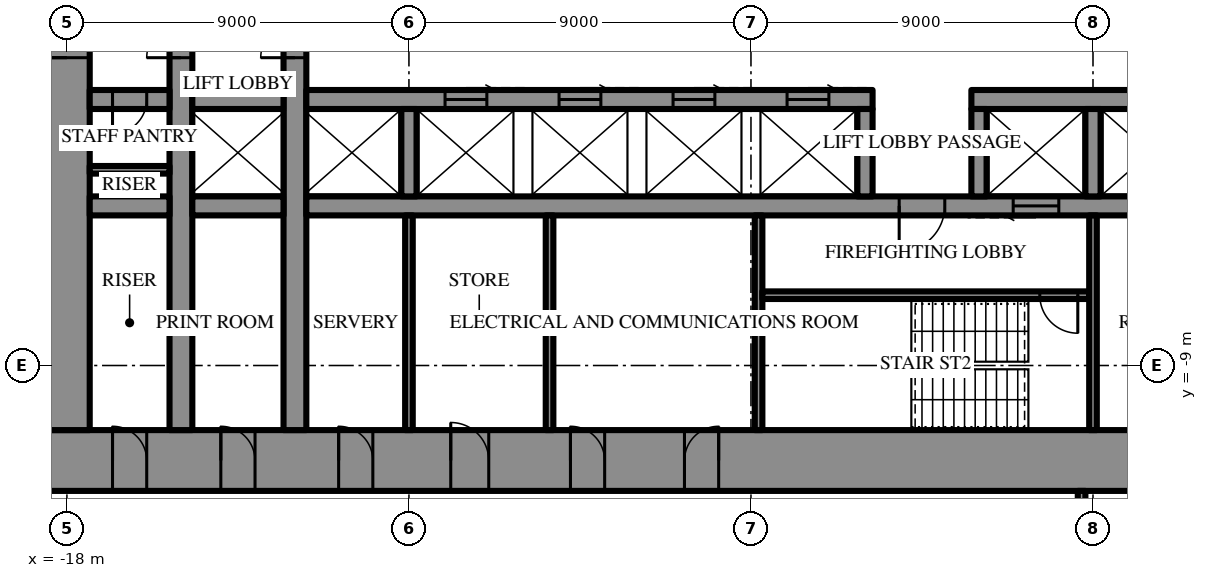
"""IFC4 building model, lengths in metres.
Left out: names, types, materials, properties, quantities, classifications, styles, units other than length and angle.
Written with IfcOpenShell. Run it as: python <this file> out.ifc"""

import sys

from ifc_helpers import new_model, si_unit, direction, frame, frame_2d, origin, place, context, subcontext, project, spatial, rectangle, extrude, element, fill, save


model = new_model("IFC4")
c1 = context("Model", 3, precision=1e-05, world=origin(), true_north=direction((0.0, 1.0)))
c2 = subcontext(c1, "Body", "Model", "MODEL_VIEW")
j1 = project(units=[si_unit("LENGTHUNIT", "METRE"), si_unit("PLANEANGLEUNIT", "RADIAN")], contexts=[c1])
p1 = place(None, origin())
s1 = spatial("IfcSite", under=j1, at=p1, CompositionType="ELEMENT")
p2 = place(p1, origin())
s2 = spatial("IfcBuilding", under=s1, at=p2, CompositionType="ELEMENT")
p3 = place(p2, frame((0.0, 0.0, 144.7)))
s3 = spatial("IfcBuildingStorey", under=s2, at=p3, CompositionType="ELEMENT", Elevation=144.7)
p4 = place(p3, frame((18.6, -11.5, 0.0), z_axis=(0.0, 0.0, 1.0), x_axis=(-1.0, 0.0, 0.0)))
e1 = element("IfcWall", 1, at=p4, inside=s3, PredefinedType="SHEAR", context=c2, shape_type="SweptSolid", body=[
    extrude(rectangle(XDim=37.2, YDim=1.6, at=frame_2d((18.6, 0.0))), origin(), (0.0, 0.0, 1.0), 4.2),
])
p5 = place(p4, frame((19.45, 0.0, 0.0)))
e2 = element("IfcOpeningElement", 2, at=p5, cuts=e1, PredefinedType="OPENING", context=c2, shape_type="SweptSolid", body=[
    extrude(rectangle(XDim=0.9, YDim=2.2, at=frame_2d((0.45, 1.1))), frame((0.0, 0.81, 0.0), z_axis=(0.0, -1.0, 0.0), x_axis=(1.0, 0.0, 0.0)), (0.0, 0.0, 1.0), 1.62),
])
p6 = place(p4, frame((22.45, 0.0, 0.0)))
e3 = element("IfcOpeningElement", 3, at=p6, cuts=e1, PredefinedType="OPENING", context=c2, shape_type="SweptSolid", body=[
    extrude(rectangle(XDim=0.9, YDim=2.2, at=frame_2d((0.45, 1.1))), frame((0.0, 0.81, 0.0), z_axis=(0.0, -1.0, 0.0), x_axis=(1.0, 0.0, 0.0)), (0.0, 0.0, 1.0), 1.62),
])
p7 = place(p4, frame((25.5, 0.0, 0.0)))
e4 = element("IfcOpeningElement", 4, at=p7, cuts=e1, PredefinedType="OPENING", context=c2, shape_type="SweptSolid", body=[
    extrude(rectangle(XDim=1.0, YDim=2.2, at=frame_2d((0.5, 1.1))), frame((0.0, 0.81, 0.0), z_axis=(0.0, -1.0, 0.0), x_axis=(1.0, 0.0, 0.0)), (0.0, 0.0, 1.0), 1.62),
])
p8 = place(p4, frame((1.8, 0.0, 0.0)))
e5 = element("IfcOpeningElement", 5, at=p8, cuts=e1, PredefinedType="OPENING", context=c2, shape_type="SweptSolid", body=[
    extrude(rectangle(XDim=0.9, YDim=2.2, at=frame_2d((0.45, 1.1))), frame((0.0, 0.81, 0.0), z_axis=(0.0, -1.0, 0.0), x_axis=(1.0, 0.0, 0.0)), (0.0, 0.0, 1.0), 1.62),
])
p9 = place(p4, frame((4.65, 0.0, 0.0)))
e6 = element("IfcOpeningElement", 6, at=p9, cuts=e1, PredefinedType="OPENING", context=c2, shape_type="SweptSolid", body=[
    extrude(rectangle(XDim=0.9, YDim=2.2, at=frame_2d((0.45, 1.1))), frame((0.0, 0.81, 0.0), z_axis=(0.0, -1.0, 0.0), x_axis=(1.0, 0.0, 0.0)), (0.0, 0.0, 1.0), 1.62),
])
p10 = place(p4, frame((7.75, 0.0, 0.0)))
e7 = element("IfcOpeningElement", 7, at=p10, cuts=e1, PredefinedType="OPENING", context=c2, shape_type="SweptSolid", body=[
    extrude(rectangle(XDim=0.9, YDim=2.2, at=frame_2d((0.45, 1.1))), frame((0.0, 0.81, 0.0), z_axis=(0.0, -1.0, 0.0), x_axis=(1.0, 0.0, 0.0)), (0.0, 0.0, 1.0), 1.62),
])
p11 = place(p4, frame((28.55, 0.0, 0.0)))
e8 = element("IfcOpeningElement", 8, at=p11, cuts=e1, PredefinedType="OPENING", context=c2, shape_type="SweptSolid", body=[
    extrude(rectangle(XDim=0.9, YDim=2.2, at=frame_2d((0.45, 1.1))), frame((0.0, 0.81, 0.0), z_axis=(0.0, -1.0, 0.0), x_axis=(1.0, 0.0, 0.0)), (0.0, 0.0, 1.0), 1.62),
])
p12 = place(p4, frame((31.65, 0.0, 0.0)))
e9 = element("IfcOpeningElement", 9, at=p12, cuts=e1, PredefinedType="OPENING", context=c2, shape_type="SweptSolid", body=[
    extrude(rectangle(XDim=0.9, YDim=2.2, at=frame_2d((0.45, 1.1))), frame((0.0, 0.81, 0.0), z_axis=(0.0, -1.0, 0.0), x_axis=(1.0, 0.0, 0.0)), (0.0, 0.0, 1.0), 1.62),
])
p13 = place(p4, frame((34.5, 0.0, 0.0)))
e10 = element("IfcOpeningElement", 10, at=p13, cuts=e1, PredefinedType="OPENING", context=c2, shape_type="SweptSolid", body=[
    extrude(rectangle(XDim=0.9, YDim=2.2, at=frame_2d((0.45, 1.1))), frame((0.0, 0.81, 0.0), z_axis=(0.0, -1.0, 0.0), x_axis=(1.0, 0.0, 0.0)), (0.0, 0.0, 1.0), 1.62),
])
p14 = place(p3, frame((-18.0, 10.7, 0.0), z_axis=(0.0, 0.0, 1.0), x_axis=(0.0, -1.0, 0.0)))
e11 = element("IfcWall", 11, at=p14, inside=s3, PredefinedType="SHEAR", context=c2, shape_type="SweptSolid", body=[
    extrude(rectangle(XDim=21.4, YDim=1.2, at=frame_2d((10.7, 0.0))), origin(), (0.0, 0.0, 1.0), 4.2),
])
p15 = place(p14, frame((9.8, 0.0, 0.0)))
e12 = element("IfcOpeningElement", 12, at=p15, cuts=e11, PredefinedType="OPENING", context=c2, shape_type="SweptSolid", body=[
    extrude(rectangle(XDim=1.8, YDim=2.4, at=frame_2d((0.9, 1.2))), frame((0.0, 0.61, 0.0), z_axis=(0.0, -1.0, 0.0), x_axis=(1.0, 0.0, 0.0)), (0.0, 0.0, 1.0), 1.22),
])
p16 = place(p3, frame((-12.0, -10.7, 0.0), z_axis=(0.0, 0.0, 1.0), x_axis=(0.0, 1.0, 0.0)))
e13 = element("IfcWall", 13, at=p16, inside=s3, PredefinedType="SHEAR", context=c2, shape_type="SweptSolid", body=[
    extrude(rectangle(XDim=21.4, YDim=0.6, at=frame_2d((10.7, 0.0))), origin(), (0.0, 0.0, 1.0), 4.2),
])
p17 = place(p16, frame((9.8, 0.0, 0.0)))
e14 = element("IfcOpeningElement", 14, at=p17, cuts=e13, PredefinedType="OPENING", context=c2, shape_type="SweptSolid", body=[
    extrude(rectangle(XDim=1.8, YDim=2.4, at=frame_2d((0.9, 1.2))), frame((0.0, 0.31, 0.0), z_axis=(0.0, -1.0, 0.0), x_axis=(1.0, 0.0, 0.0)), (0.0, 0.0, 1.0), 0.62),
])
p18 = place(p3, frame((-15.0, -10.7, 0.0), z_axis=(0.0, 0.0, 1.0), x_axis=(0.0, 1.0, 0.0)))
e15 = element("IfcWall", 15, at=p18, inside=s3, PredefinedType="SHEAR", context=c2, shape_type="SweptSolid", body=[
    extrude(rectangle(XDim=21.4, YDim=0.6, at=frame_2d((10.7, 0.0))), origin(), (0.0, 0.0, 1.0), 4.2),
])
p19 = place(p18, frame((9.8, 0.0, 0.0)))
e16 = element("IfcOpeningElement", 16, at=p19, cuts=e15, PredefinedType="OPENING", context=c2, shape_type="SweptSolid", body=[
    extrude(rectangle(XDim=1.8, YDim=2.4, at=frame_2d((0.9, 1.2))), frame((0.0, 0.31, 0.0), z_axis=(0.0, -1.0, 0.0), x_axis=(1.0, 0.0, 0.0)), (0.0, 0.0, 1.0), 0.62),
])
p20 = place(p3, frame((11.7, -2.0, 0.0), z_axis=(0.0, 0.0, 1.0), x_axis=(-1.0, 0.0, 0.0)))
e17 = element("IfcWall", 17, at=p20, inside=s3, PredefinedType="SHEAR", context=c2, shape_type="SweptSolid", body=[
    extrude(rectangle(XDim=5.9, YDim=0.5, at=frame_2d((2.95, 0.0))), origin(), (0.0, 0.0, 1.0), 4.2),
])
p21 = place(p3, frame((3.2, -2.0, 0.0), z_axis=(0.0, 0.0, 1.0), x_axis=(-1.0, 0.0, 0.0)))
e18 = element("IfcWall", 18, at=p21, inside=s3, PredefinedType="SHEAR", context=c2, shape_type="SweptSolid", body=[
    extrude(rectangle(XDim=14.9, YDim=0.5, at=frame_2d((7.45, 0.0))), origin(), (0.0, 0.0, 1.0), 4.2),
])
p22 = place(p21, frame((1.15, 0.0, 0.0)))
e19 = element("IfcOpeningElement", 19, at=p22, cuts=e18, PredefinedType="OPENING", context=c2, shape_type="SweptSolid", body=[
    extrude(rectangle(XDim=1.1, YDim=2.2, at=frame_2d((0.55, 1.1))), frame((0.0, 0.26, 0.0), z_axis=(0.0, -1.0, 0.0), x_axis=(1.0, 0.0, 0.0)), (0.0, 0.0, 1.0), 0.52),
])
p23 = place(p21, frame((4.15, 0.0, 0.0)))
e20 = element("IfcOpeningElement", 20, at=p23, cuts=e18, PredefinedType="OPENING", context=c2, shape_type="SweptSolid", body=[
    extrude(rectangle(XDim=1.1, YDim=2.2, at=frame_2d((0.55, 1.1))), frame((0.0, 0.26, 0.0), z_axis=(0.0, -1.0, 0.0), x_axis=(1.0, 0.0, 0.0)), (0.0, 0.0, 1.0), 0.52),
])
p24 = place(p21, frame((7.15, 0.0, 0.0)))
e21 = element("IfcOpeningElement", 21, at=p24, cuts=e18, PredefinedType="OPENING", context=c2, shape_type="SweptSolid", body=[
    extrude(rectangle(XDim=1.1, YDim=2.2, at=frame_2d((0.55, 1.1))), frame((0.0, 0.26, 0.0), z_axis=(0.0, -1.0, 0.0), x_axis=(1.0, 0.0, 0.0)), (0.0, 0.0, 1.0), 0.52),
])
p25 = place(p21, frame((10.15, 0.0, 0.0)))
e22 = element("IfcOpeningElement", 22, at=p25, cuts=e18, PredefinedType="OPENING", context=c2, shape_type="SweptSolid", body=[
    extrude(rectangle(XDim=1.1, YDim=2.2, at=frame_2d((0.55, 1.1))), frame((0.0, 0.26, 0.0), z_axis=(0.0, -1.0, 0.0), x_axis=(1.0, 0.0, 0.0)), (0.0, 0.0, 1.0), 0.52),
])
p26 = place(p3, frame((-12.3, -2.0, 0.0), z_axis=(0.0, 0.0, 1.0), x_axis=(-1.0, 0.0, 0.0)))
e23 = element("IfcWall", 23, at=p26, inside=s3, PredefinedType="SHEAR", context=c2, shape_type="SweptSolid", body=[
    extrude(rectangle(XDim=2.4, YDim=0.5, at=frame_2d((1.2, 0.0))), origin(), (0.0, 0.0, 1.0), 4.2),
])
p27 = place(p3, frame((-15.3, -2.0, 0.0), z_axis=(0.0, 0.0, 1.0), x_axis=(-1.0, 0.0, 0.0)))
e24 = element("IfcWall", 24, at=p27, inside=s3, PredefinedType="SHEAR", context=c2, shape_type="SweptSolid", body=[
    extrude(rectangle(XDim=2.1, YDim=0.5, at=frame_2d((1.05, 0.0))), origin(), (0.0, 0.0, 1.0), 4.2),
])
p28 = place(p27, frame((0.6, 0.0, 0.0)))
e25 = element("IfcOpeningElement", 25, at=p28, cuts=e24, PredefinedType="OPENING", context=c2, shape_type="SweptSolid", body=[
    extrude(rectangle(XDim=0.9, YDim=2.2, at=frame_2d((0.45, 1.1))), frame((0.0, 0.26, 0.0), z_axis=(0.0, -1.0, 0.0), x_axis=(1.0, 0.0, 0.0)), (0.0, 0.0, 1.0), 0.52),
])
p29 = place(p3, frame((11.7, -4.8, 0.0), z_axis=(0.0, 0.0, 1.0), x_axis=(-1.0, 0.0, 0.0)))
e26 = element("IfcWall", 26, at=p29, inside=s3, PredefinedType="SHEAR", context=c2, shape_type="SweptSolid", body=[
    extrude(rectangle(XDim=23.4, YDim=0.5, at=frame_2d((11.7, 0.0))), origin(), (0.0, 0.0, 1.0), 4.2),
])
p30 = place(p29, frame((6.6, 0.0, 0.0)))
e27 = element("IfcOpeningElement", 27, at=p30, cuts=e26, PredefinedType="OPENING", context=c2, shape_type="SweptSolid", body=[
    extrude(rectangle(XDim=1.2, YDim=2.2, at=frame_2d((0.6, 1.1))), frame((0.0, 0.26, 0.0), z_axis=(0.0, -1.0, 0.0), x_axis=(1.0, 0.0, 0.0)), (0.0, 0.0, 1.0), 0.52),
])
p31 = place(p29, frame((3.6, 0.0, 0.0)))
e28 = element("IfcOpeningElement", 28, at=p31, cuts=e26, PredefinedType="OPENING", context=c2, shape_type="SweptSolid", body=[
    extrude(rectangle(XDim=1.2, YDim=2.2, at=frame_2d((0.6, 1.1))), frame((0.0, 0.26, 0.0), z_axis=(0.0, -1.0, 0.0), x_axis=(1.0, 0.0, 0.0)), (0.0, 0.0, 1.0), 0.52),
])
p32 = place(p3, frame((-12.3, -4.8, 0.0), z_axis=(0.0, 0.0, 1.0), x_axis=(-1.0, 0.0, 0.0)))
e29 = element("IfcWall", 29, at=p32, inside=s3, PredefinedType="SHEAR", context=c2, shape_type="SweptSolid", body=[
    extrude(rectangle(XDim=2.4, YDim=0.5, at=frame_2d((1.2, 0.0))), origin(), (0.0, 0.0, 1.0), 4.2),
])
p33 = place(p3, frame((-15.3, -4.8, 0.0), z_axis=(0.0, 0.0, 1.0), x_axis=(-1.0, 0.0, 0.0)))
e30 = element("IfcWall", 30, at=p33, inside=s3, PredefinedType="SHEAR", context=c2, shape_type="SweptSolid", body=[
    extrude(rectangle(XDim=2.1, YDim=0.5, at=frame_2d((1.05, 0.0))), origin(), (0.0, 0.0, 1.0), 4.2),
])
for number, where, z_axis, x_axis in (
    (31, (9.0, -2.25, 0.0), (0.0, 0.0, 1.0), (0.0, -1.0, 0.0)),
    (32, (6.0, -2.25, 0.0), (0.0, 0.0, 1.0), (0.0, -1.0, 0.0)),
    (33, (3.0, -2.25, 0.0), (0.0, 0.0, 1.0), (0.0, -1.0, 0.0)),
    (34, (-9.0, -2.25, 0.0), (0.0, 0.0, 1.0), (0.0, -1.0, 0.0)),
):
    element("IfcWall", number, at=place(p3, frame(where, z_axis=z_axis, x_axis=x_axis)), inside=s3, PredefinedType="SHEAR", context=c2, shape_type="SweptSolid", body=[
        extrude(rectangle(XDim=2.3, YDim=0.4, at=frame_2d((1.15, 0.0))), origin(), (0.0, 0.0, 1.0), 4.2),
    ])
p34 = place(p3, frame((0.2, -5.05, 0.0), z_axis=(0.0, 0.0, 1.0), x_axis=(0.0, -1.0, 0.0)))
e35 = element("IfcWall", 35, at=p34, inside=s3, PredefinedType="SHEAR", context=c2, shape_type="SweptSolid", body=[
    extrude(rectangle(XDim=5.65, YDim=0.2, at=frame_2d((2.825, 0.0))), origin(), (0.0, 0.0, 1.0), 4.2),
])
p35 = place(p3, frame((8.9, -7.15, 0.0), z_axis=(0.0, 0.0, 1.0), x_axis=(-1.0, 0.0, 0.0)))
e36 = element("IfcWall", 36, at=p35, inside=s3, PredefinedType="SHEAR", context=c2, shape_type="SweptSolid", body=[
    extrude(rectangle(XDim=8.6, YDim=0.2, at=frame_2d((4.3, 0.0))), origin(), (0.0, 0.0, 1.0), 4.2),
])
p36 = place(p35, frame((0.3, 0.0, 0.0)))
e37 = element("IfcOpeningElement", 37, at=p36, cuts=e36, PredefinedType="OPENING", context=c2, shape_type="SweptSolid", body=[
    extrude(rectangle(XDim=1.0, YDim=2.2, at=frame_2d((0.5, 1.1))), frame((0.0, 0.11, 0.0), z_axis=(0.0, -1.0, 0.0), x_axis=(1.0, 0.0, 0.0)), (0.0, 0.0, 1.0), 0.22),
])
for number, where, z_axis, x_axis in (
    (38, (9.0, -5.05, 0.0), (0.0, 0.0, 1.0), (0.0, -1.0, 0.0)),
    (39, (-9.0, -5.05, 0.0), (0.0, 0.0, 1.0), (0.0, -1.0, 0.0)),
    (40, (-5.3, -5.05, 0.0), (0.0, 0.0, 1.0), (0.0, -1.0, 0.0)),
):
    element("IfcWall", number, at=place(p3, frame(where, z_axis=z_axis, x_axis=x_axis)), inside=s3, PredefinedType="PARTITIONING", context=c2, shape_type="SweptSolid", body=[
        extrude(rectangle(XDim=5.65, YDim=0.2, at=frame_2d((2.825, 0.0))), origin(), (0.0, 0.0, 1.0), 4.0),
    ])
p37 = place(p3, frame((-15.3, -3.85, 0.0), z_axis=(0.0, 0.0, 1.0), x_axis=(-1.0, 0.0, 0.0)))
e41 = element("IfcWall", 41, at=p37, inside=s3, PredefinedType="PARTITIONING", context=c2, shape_type="SweptSolid", body=[
    extrude(rectangle(XDim=2.1, YDim=0.2, at=frame_2d((1.05, 0.0))), origin(), (0.0, 0.0, 1.0), 4.0),
])
p38 = place(p3, frame((8.7, -12.3, 0.0), z_axis=(0.0, 0.0, 1.0), x_axis=(0.0, -1.0, 0.0)))
e42 = element("IfcWall", 42, at=p38, inside=s3, PredefinedType="PARTITIONING", context=c2, shape_type="SweptSolid", body=[
    extrude(rectangle(XDim=19.0, YDim=0.2, at=frame_2d((9.5, 0.0))), origin(), (0.0, 0.0, 1.0), 4.0),
])
p39 = place(p38, frame((1.4, 0.0, 0.0)))
e43 = element("IfcOpeningElement", 43, at=p39, cuts=e42, PredefinedType="OPENING", context=c2, shape_type="SweptSolid", body=[
    extrude(rectangle(XDim=1.0, YDim=2.2, at=frame_2d((0.5, 1.1))), frame((0.0, 0.11, 0.0), z_axis=(0.0, -1.0, 0.0), x_axis=(1.0, 0.0, 0.0)), (0.0, 0.0, 1.0), 0.22),
])
p40 = place(p15, frame((1.8, 0.0, 0.0), z_axis=(0.0, 0.0, 1.0), x_axis=(-1.0, 0.0, 0.0)))
e44 = element("IfcDoor", 44, at=p40, inside=s3, OperationType="DOUBLE_DOOR_SINGLE_SWING", PredefinedType="DOOR", context=c2, shape_type="SweptSolid", body=[
    extrude(rectangle(XDim=1.8, YDim=2.4, at=frame_2d((0.9, 1.2))), frame((0.0, 0.025, 0.0), z_axis=(0.0, -1.0, 0.0), x_axis=(1.0, 0.0, 0.0)), (0.0, 0.0, 1.0), 0.05),
])
fill(e12, e44)
p41 = place(p30, origin())
e45 = element("IfcDoor", 45, at=p41, inside=s3, OperationType="SINGLE_SWING_LEFT", PredefinedType="DOOR", context=c2, shape_type="SweptSolid", body=[
    extrude(rectangle(XDim=1.2, YDim=2.2, at=frame_2d((0.6, 1.1))), frame((0.0, 0.025, 0.0), z_axis=(0.0, -1.0, 0.0), x_axis=(1.0, 0.0, 0.0)), (0.0, 0.0, 1.0), 0.05),
])
fill(e27, e45)
p42 = place(p36, origin())
e46 = element("IfcDoor", 46, at=p42, inside=s3, OperationType="SINGLE_SWING_RIGHT", PredefinedType="DOOR", context=c2, shape_type="SweptSolid", body=[
    extrude(rectangle(XDim=1.0, YDim=2.2, at=frame_2d((0.5, 1.1))), frame((0.0, 0.025, 0.0), z_axis=(0.0, -1.0, 0.0), x_axis=(1.0, 0.0, 0.0)), (0.0, 0.0, 1.0), 0.05),
])
fill(e37, e46)
p43 = place(p5, frame((0.9, 0.0, 0.0), z_axis=(0.0, 0.0, 1.0), x_axis=(-1.0, 0.0, 0.0)))
e47 = element("IfcDoor", 47, at=p43, inside=s3, OperationType="SINGLE_SWING_LEFT", PredefinedType="DOOR", context=c2, shape_type="SweptSolid", body=[
    extrude(rectangle(XDim=0.9, YDim=2.2, at=frame_2d((0.45, 1.1))), frame((0.0, 0.025, 0.0), z_axis=(0.0, -1.0, 0.0), x_axis=(1.0, 0.0, 0.0)), (0.0, 0.0, 1.0), 0.05),
])
fill(e2, e47)
p44 = place(p6, frame((0.9, 0.0, 0.0), z_axis=(0.0, 0.0, 1.0), x_axis=(-1.0, 0.0, 0.0)))
e48 = element("IfcDoor", 48, at=p44, inside=s3, OperationType="SINGLE_SWING_RIGHT", PredefinedType="DOOR", context=c2, shape_type="SweptSolid", body=[
    extrude(rectangle(XDim=0.9, YDim=2.2, at=frame_2d((0.45, 1.1))), frame((0.0, 0.025, 0.0), z_axis=(0.0, -1.0, 0.0), x_axis=(1.0, 0.0, 0.0)), (0.0, 0.0, 1.0), 0.05),
])
fill(e3, e48)
p45 = place(p7, frame((1.0, 0.0, 0.0), z_axis=(0.0, 0.0, 1.0), x_axis=(-1.0, 0.0, 0.0)))
e49 = element("IfcDoor", 49, at=p45, inside=s3, OperationType="SINGLE_SWING_RIGHT", PredefinedType="DOOR", context=c2, shape_type="SweptSolid", body=[
    extrude(rectangle(XDim=1.0, YDim=2.2, at=frame_2d((0.5, 1.1))), frame((0.0, 0.025, 0.0), z_axis=(0.0, -1.0, 0.0), x_axis=(1.0, 0.0, 0.0)), (0.0, 0.0, 1.0), 0.05),
])
fill(e4, e49)
p46 = place(p11, frame((0.9, 0.0, 0.0), z_axis=(0.0, 0.0, 1.0), x_axis=(-1.0, 0.0, 0.0)))
e50 = element("IfcDoor", 50, at=p46, inside=s3, OperationType="SINGLE_SWING_RIGHT", PredefinedType="DOOR", context=c2, shape_type="SweptSolid", body=[
    extrude(rectangle(XDim=0.9, YDim=2.2, at=frame_2d((0.45, 1.1))), frame((0.0, 0.025, 0.0), z_axis=(0.0, -1.0, 0.0), x_axis=(1.0, 0.0, 0.0)), (0.0, 0.0, 1.0), 0.05),
])
fill(e8, e50)
p47 = place(p12, frame((0.9, 0.0, 0.0), z_axis=(0.0, 0.0, 1.0), x_axis=(-1.0, 0.0, 0.0)))
e51 = element("IfcDoor", 51, at=p47, inside=s3, OperationType="SINGLE_SWING_RIGHT", PredefinedType="DOOR", context=c2, shape_type="SweptSolid", body=[
    extrude(rectangle(XDim=0.9, YDim=2.2, at=frame_2d((0.45, 1.1))), frame((0.0, 0.025, 0.0), z_axis=(0.0, -1.0, 0.0), x_axis=(1.0, 0.0, 0.0)), (0.0, 0.0, 1.0), 0.05),
])
fill(e9, e51)
p48 = place(p13, frame((0.9, 0.0, 0.0), z_axis=(0.0, 0.0, 1.0), x_axis=(-1.0, 0.0, 0.0)))
e52 = element("IfcDoor", 52, at=p48, inside=s3, OperationType="SINGLE_SWING_RIGHT", PredefinedType="DOOR", context=c2, shape_type="SweptSolid", body=[
    extrude(rectangle(XDim=0.9, YDim=2.2, at=frame_2d((0.45, 1.1))), frame((0.0, 0.025, 0.0), z_axis=(0.0, -1.0, 0.0), x_axis=(1.0, 0.0, 0.0)), (0.0, 0.0, 1.0), 0.05),
])
fill(e10, e52)
p49 = place(p28, origin())
e53 = element("IfcDoor", 53, at=p49, inside=s3, OperationType="SINGLE_SWING_LEFT", PredefinedType="DOOR", context=c2, shape_type="SweptSolid", body=[
    extrude(rectangle(XDim=0.9, YDim=2.2, at=frame_2d((0.45, 1.1))), frame((0.0, 0.025, 0.0), z_axis=(0.0, -1.0, 0.0), x_axis=(1.0, 0.0, 0.0)), (0.0, 0.0, 1.0), 0.05),
])
fill(e25, e53)
p50 = place(p17, origin())
e54 = element("IfcDoor", 54, at=p50, inside=s3, OperationType="DOUBLE_DOOR_SINGLE_SWING", PredefinedType="DOOR", context=c2, shape_type="SweptSolid", body=[
    extrude(rectangle(XDim=1.8, YDim=2.4, at=frame_2d((0.9, 1.2))), frame((0.0, 0.025, 0.0), z_axis=(0.0, -1.0, 0.0), x_axis=(1.0, 0.0, 0.0)), (0.0, 0.0, 1.0), 0.05),
])
fill(e14, e54)
p51 = place(p19, origin())
e55 = element("IfcDoor", 55, at=p51, inside=s3, OperationType="DOUBLE_DOOR_SINGLE_SWING", PredefinedType="DOOR", context=c2, shape_type="SweptSolid", body=[
    extrude(rectangle(XDim=1.8, YDim=2.4, at=frame_2d((0.9, 1.2))), frame((0.0, 0.025, 0.0), z_axis=(0.0, -1.0, 0.0), x_axis=(1.0, 0.0, 0.0)), (0.0, 0.0, 1.0), 0.05),
])
fill(e16, e55)
p52 = place(p31, origin())
e56 = element("IfcDoor", 56, at=p52, inside=s3, OperationType="SLIDING_TO_LEFT", PredefinedType="DOOR", context=c2, shape_type="SweptSolid", body=[
    extrude(rectangle(XDim=1.2, YDim=2.2, at=frame_2d((0.6, 1.1))), frame((0.0, 0.025, 0.0), z_axis=(0.0, -1.0, 0.0), x_axis=(1.0, 0.0, 0.0)), (0.0, 0.0, 1.0), 0.05),
])
fill(e28, e56)
p53 = place(p22, frame((1.1, 0.0, 0.0), z_axis=(0.0, 0.0, 1.0), x_axis=(-1.0, 0.0, 0.0)))
e57 = element("IfcDoor", 57, at=p53, inside=s3, OperationType="SLIDING_TO_LEFT", PredefinedType="DOOR", context=c2, shape_type="SweptSolid", body=[
    extrude(rectangle(XDim=1.1, YDim=2.2, at=frame_2d((0.55, 1.1))), frame((0.0, 0.025, 0.0), z_axis=(0.0, -1.0, 0.0), x_axis=(1.0, 0.0, 0.0)), (0.0, 0.0, 1.0), 0.05),
])
fill(e19, e57)
p54 = place(p23, frame((1.1, 0.0, 0.0), z_axis=(0.0, 0.0, 1.0), x_axis=(-1.0, 0.0, 0.0)))
e58 = element("IfcDoor", 58, at=p54, inside=s3, OperationType="SLIDING_TO_LEFT", PredefinedType="DOOR", context=c2, shape_type="SweptSolid", body=[
    extrude(rectangle(XDim=1.1, YDim=2.2, at=frame_2d((0.55, 1.1))), frame((0.0, 0.025, 0.0), z_axis=(0.0, -1.0, 0.0), x_axis=(1.0, 0.0, 0.0)), (0.0, 0.0, 1.0), 0.05),
])
fill(e20, e58)
p55 = place(p24, frame((1.1, 0.0, 0.0), z_axis=(0.0, 0.0, 1.0), x_axis=(-1.0, 0.0, 0.0)))
e59 = element("IfcDoor", 59, at=p55, inside=s3, OperationType="SLIDING_TO_LEFT", PredefinedType="DOOR", context=c2, shape_type="SweptSolid", body=[
    extrude(rectangle(XDim=1.1, YDim=2.2, at=frame_2d((0.55, 1.1))), frame((0.0, 0.025, 0.0), z_axis=(0.0, -1.0, 0.0), x_axis=(1.0, 0.0, 0.0)), (0.0, 0.0, 1.0), 0.05),
])
fill(e21, e59)
p56 = place(p25, frame((1.1, 0.0, 0.0), z_axis=(0.0, 0.0, 1.0), x_axis=(-1.0, 0.0, 0.0)))
e60 = element("IfcDoor", 60, at=p56, inside=s3, OperationType="SLIDING_TO_LEFT", PredefinedType="DOOR", context=c2, shape_type="SweptSolid", body=[
    extrude(rectangle(XDim=1.1, YDim=2.2, at=frame_2d((0.55, 1.1))), frame((0.0, 0.025, 0.0), z_axis=(0.0, -1.0, 0.0), x_axis=(1.0, 0.0, 0.0)), (0.0, 0.0, 1.0), 0.05),
])
fill(e22, e60)
save(model, sys.argv[1])
